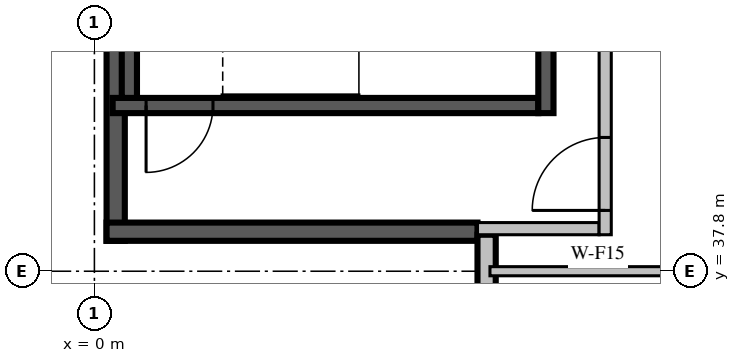
"""IFC4 building model, lengths in metres.
Left out: names, types, materials, properties, quantities, classifications, styles, units other than length and angle.
Written with IfcOpenShell. Run it as: python <this file> out.ifc"""

import sys

from ifc_helpers import new_model, si_unit, direction, frame, frame_2d, origin, place, context, subcontext, project, spatial, rectangle, extrude, source, transform, mapped, element, fill, save


model = new_model("IFC4")
c1 = context("Model", 3, precision=1e-05, world=origin(), true_north=direction((0.0, 1.0)))
c2 = subcontext(c1, "Body", "Model", "MODEL_VIEW")
j1 = project(units=[si_unit("LENGTHUNIT", "METRE"), si_unit("PLANEANGLEUNIT", "RADIAN")], contexts=[c1])
p1 = place(None, origin())
s1 = spatial("IfcSite", under=j1, at=p1, CompositionType="ELEMENT")
p2 = place(p1, origin())
s2 = spatial("IfcBuilding", under=s1, at=p2, CompositionType="ELEMENT")
p3 = place(p2, frame((0.0, 0.0, 177.8)))
s3 = spatial("IfcBuildingStorey", under=s2, at=p3, CompositionType="ELEMENT", Elevation=177.8)
p4 = place(p3, frame((0.35, 43.95, 0.0), z_axis=(0.0, 0.0, 1.0), x_axis=(0.0, -1.0, 0.0)))
e1 = element("IfcWall", 1, at=p4, inside=s3, PredefinedType="SOLIDWALL", context=c2, shape_type="SweptSolid", body=[
    extrude(rectangle(XDim=5.65, YDim=0.3, at=frame_2d((2.825, 0.0))), origin(), (0.0, 0.0, 1.0), 3.4),
])
m1 = source(origin(), c2, "Body", "SweptSolid", [
    extrude(rectangle(XDim=6.1, YDim=0.3, at=frame_2d((3.05, 0.0))), origin(), (0.0, 0.0, 1.0), 3.4),
])
p5 = place(p3, frame((0.2, 38.45, 0.0), z_axis=(0.0, 0.0, 1.0), x_axis=(1.0, 0.0, 0.0)))
e2 = element("IfcWall", 2, at=p5, inside=s3, PredefinedType="SOLIDWALL", context=c2, shape_type="MappedRepresentation", body=[
    mapped(m1, transform((0.0, 0.0, 0.0), scale=1.0)),
])
p6 = place(p3, frame((6.45, 38.4, 0.0), z_axis=(0.0, 0.0, 1.0), x_axis=(0.0, -1.0, 0.0)))
e3 = element("IfcWall", 3, at=p6, inside=s3, PredefinedType="STANDARD", context=c2, shape_type="SweptSolid", body=[
    extrude(rectangle(XDim=16.6, YDim=0.3, at=frame_2d((8.3, 0.0))), origin(), (0.0, 0.0, 1.0), 3.4),
])
m2 = source(origin(), c2, "Body", "SweptSolid", [
    extrude(rectangle(XDim=1.8, YDim=2.3, at=frame_2d((0.9, 1.15))), frame((0.0, 0.16, 0.0), z_axis=(0.0, -1.0, 0.0), x_axis=(1.0, 0.0, 0.0)), (0.0, 0.0, 1.0), 0.32),
])
p7 = place(p6, frame((1.15, 0.0, 0.6)))
e4 = element("IfcOpeningElement", 4, at=p7, cuts=e3, PredefinedType="OPENING", context=c2, shape_type="MappedRepresentation", body=[
    mapped(m2, transform((0.0, 0.0, 0.0), scale=1.0)),
])
p8 = place(p6, frame((5.162, 0.0, 0.6)))
e5 = element("IfcOpeningElement", 5, at=p8, cuts=e3, PredefinedType="OPENING", context=c2, shape_type="MappedRepresentation", body=[
    mapped(m2, transform((0.0, 0.0, 0.0), scale=1.0)),
])
p9 = place(p6, frame((9.438, 0.0, 0.6)))
e6 = element("IfcOpeningElement", 6, at=p9, cuts=e3, PredefinedType="OPENING", context=c2, shape_type="MappedRepresentation", body=[
    mapped(m2, transform((0.0, 0.0, 0.0), scale=1.0)),
])
m3 = source(origin(), c2, "Body", "SweptSolid", [
    extrude(rectangle(XDim=1.2, YDim=2.3, at=frame_2d((0.6, 1.15))), frame((0.0, 0.16, 0.0), z_axis=(0.0, -1.0, 0.0), x_axis=(1.0, 0.0, 0.0)), (0.0, 0.0, 1.0), 0.32),
])
p10 = place(p6, frame((13.012, 0.0, 0.6)))
e7 = element("IfcOpeningElement", 7, at=p10, cuts=e3, PredefinedType="OPENING", context=c2, shape_type="MappedRepresentation", body=[
    mapped(m3, transform((0.0, 0.0, 0.0), scale=1.0)),
])
m4 = source(origin(), c2, "Body", "SweptSolid", [
    extrude(rectangle(XDim=7.0, YDim=0.25, at=frame_2d((3.5, 0.0))), origin(), (0.0, 0.0, 1.0), 3.4),
])
p11 = place(p3, frame((0.3, 40.525, 0.0), z_axis=(0.0, 0.0, 1.0), x_axis=(1.0, 0.0, 0.0)))
e8 = element("IfcWall", 8, at=p11, inside=s3, PredefinedType="SOLIDWALL", context=c2, shape_type="MappedRepresentation", body=[
    mapped(m4, transform((0.0, 0.0, 0.0), scale=1.0)),
])
m5 = source(origin(), c2, "Body", "SweptSolid", [
    extrude(rectangle(XDim=1.1, YDim=2.1, at=frame_2d((0.55, 1.05))), frame((0.0, 0.135, 0.0), z_axis=(0.0, -1.0, 0.0), x_axis=(1.0, 0.0, 0.0)), (0.0, 0.0, 1.0), 0.27),
])
p12 = place(p11, frame((0.55, 0.0, 0.0)))
e9 = element("IfcOpeningElement", 9, at=p12, cuts=e8, PredefinedType="OPENING", context=c2, shape_type="MappedRepresentation", body=[
    mapped(m5, transform((0.0, 0.0, 0.0), scale=1.0)),
])
m6 = source(origin(), c2, "Body", "SweptSolid", [
    extrude(rectangle(XDim=3.45, YDim=0.25, at=frame_2d((1.725, 0.0))), origin(), (0.0, 0.0, 1.0), 3.4),
])
p13 = place(p3, frame((7.425, 40.4, 0.0), z_axis=(0.0, 0.0, 1.0), x_axis=(0.0, 1.0, 0.0)))
e10 = element("IfcWall", 10, at=p13, inside=s3, PredefinedType="SOLIDWALL", context=c2, shape_type="MappedRepresentation", body=[
    mapped(m6, transform((0.0, 0.0, 0.0), scale=1.0)),
])
m7 = source(origin(), c2, "Body", "SweptSolid", [
    extrude(rectangle(XDim=2.95, YDim=0.25, at=frame_2d((1.475, 0.0))), origin(), (0.0, 0.0, 1.0), 3.4),
])
p14 = place(p3, frame((0.575, 40.65, 0.0), z_axis=(0.0, 0.0, 1.0), x_axis=(0.0, 1.0, 0.0)))
e11 = element("IfcWall", 11, at=p14, inside=s3, PredefinedType="SOLIDWALL", context=c2, shape_type="MappedRepresentation", body=[
    mapped(m7, transform((0.0, 0.0, 0.0), scale=1.0)),
])
p15 = place(p3, frame((6.3, 38.5, 0.0), z_axis=(0.0, 0.0, 1.0), x_axis=(1.0, 0.0, 0.0)))
e12 = element("IfcWall", 12, at=p15, inside=s3, PredefinedType="PARTITIONING", context=c2, shape_type="SweptSolid", body=[
    extrude(rectangle(XDim=2.0, YDim=0.2, at=frame_2d((1.0, 0.0))), origin(), (0.0, 0.0, 1.0), 3.4),
])
m8 = source(origin(), c2, "Body", "SweptSolid", [
    extrude(rectangle(XDim=5.45, YDim=0.2, at=frame_2d((2.725, 0.0))), origin(), (0.0, 0.0, 1.0), 3.4),
])
p16 = place(p3, frame((8.4, 38.4, 0.0), z_axis=(0.0, 0.0, 1.0), x_axis=(0.0, 1.0, 0.0)))
e13 = element("IfcWall", 13, at=p16, inside=s3, PredefinedType="PARTITIONING", context=c2, shape_type="MappedRepresentation", body=[
    mapped(m8, transform((0.0, 0.0, 0.0), scale=1.0)),
])
m9 = source(origin(), c2, "Body", "SweptSolid", [
    extrude(rectangle(XDim=1.2, YDim=2.1, at=frame_2d((0.6, 1.05))), frame((0.0, 0.11, 0.0), z_axis=(0.0, -1.0, 0.0), x_axis=(1.0, 0.0, 0.0)), (0.0, 0.0, 1.0), 0.22),
])
p17 = place(p16, frame((0.4, 0.0, 0.0)))
e14 = element("IfcOpeningElement", 14, at=p17, cuts=e13, PredefinedType="OPENING", context=c2, shape_type="MappedRepresentation", body=[
    mapped(m9, transform((0.0, 0.0, 0.0), scale=1.0)),
])
m10 = source(origin(), c2, "Body", "SweptSolid", [
    extrude(rectangle(XDim=0.9, YDim=2.1, at=frame_2d((0.45, 1.05))), frame((0.0, 0.11, 0.0), z_axis=(0.0, -1.0, 0.0), x_axis=(1.0, 0.0, 0.0)), (0.0, 0.0, 1.0), 0.22),
])
p18 = place(p16, frame((3.25, 0.0, 0.0)))
e15 = element("IfcOpeningElement", 15, at=p18, cuts=e13, PredefinedType="OPENING", context=c2, shape_type="MappedRepresentation", body=[
    mapped(m10, transform((0.0, 0.0, 0.0), scale=1.0)),
])
m11 = source(origin(), c2, "Body", "SweptSolid", [
    extrude(rectangle(XDim=3.546, YDim=0.15, at=frame_2d((1.773, 0.0))), origin(), (0.0, 0.0, 1.0), 3.4),
])
p19 = place(p3, frame((10.051, 37.8, 0.0), z_axis=(0.0, 0.0, 1.0), x_axis=(-1.0, 0.0, 0.0)))
e16 = element("IfcWall", 16, at=p19, inside=s3, PredefinedType="PARTITIONING", context=c2, shape_type="MappedRepresentation", body=[
    mapped(m11, transform((0.0, 0.0, 0.0), scale=1.0)),
])
m12 = source(origin(), c2, "Body", "SweptSolid", [
    extrude(rectangle(XDim=1.1, YDim=2.1, at=frame_2d((0.55, 1.05))), frame((0.0, 0.025, 0.0), z_axis=(0.0, -1.0, 0.0), x_axis=(1.0, 0.0, 0.0)), (0.0, 0.0, 1.0), 0.05),
])
p20 = place(p12, origin())
e17 = element("IfcDoor", 17, at=p20, inside=s3, OperationType="SINGLE_SWING_RIGHT", PredefinedType="DOOR", context=c2, shape_type="MappedRepresentation", body=[
    mapped(m12, transform((0.0, 0.0, 0.0), scale=1.0)),
])
fill(e9, e17)
m13 = source(origin(), c2, "Body", "SweptSolid", [
    extrude(rectangle(XDim=1.2, YDim=2.1, at=frame_2d((0.6, 1.05))), frame((0.0, 0.025, 0.0), z_axis=(0.0, -1.0, 0.0), x_axis=(1.0, 0.0, 0.0)), (0.0, 0.0, 1.0), 0.05),
])
p21 = place(p17, origin())
e18 = element("IfcDoor", 18, at=p21, inside=s3, OperationType="SINGLE_SWING_LEFT", PredefinedType="DOOR", context=c2, shape_type="MappedRepresentation", body=[
    mapped(m13, transform((0.0, 0.0, 0.0), scale=1.0)),
])
fill(e14, e18)
save(model, sys.argv[1])
